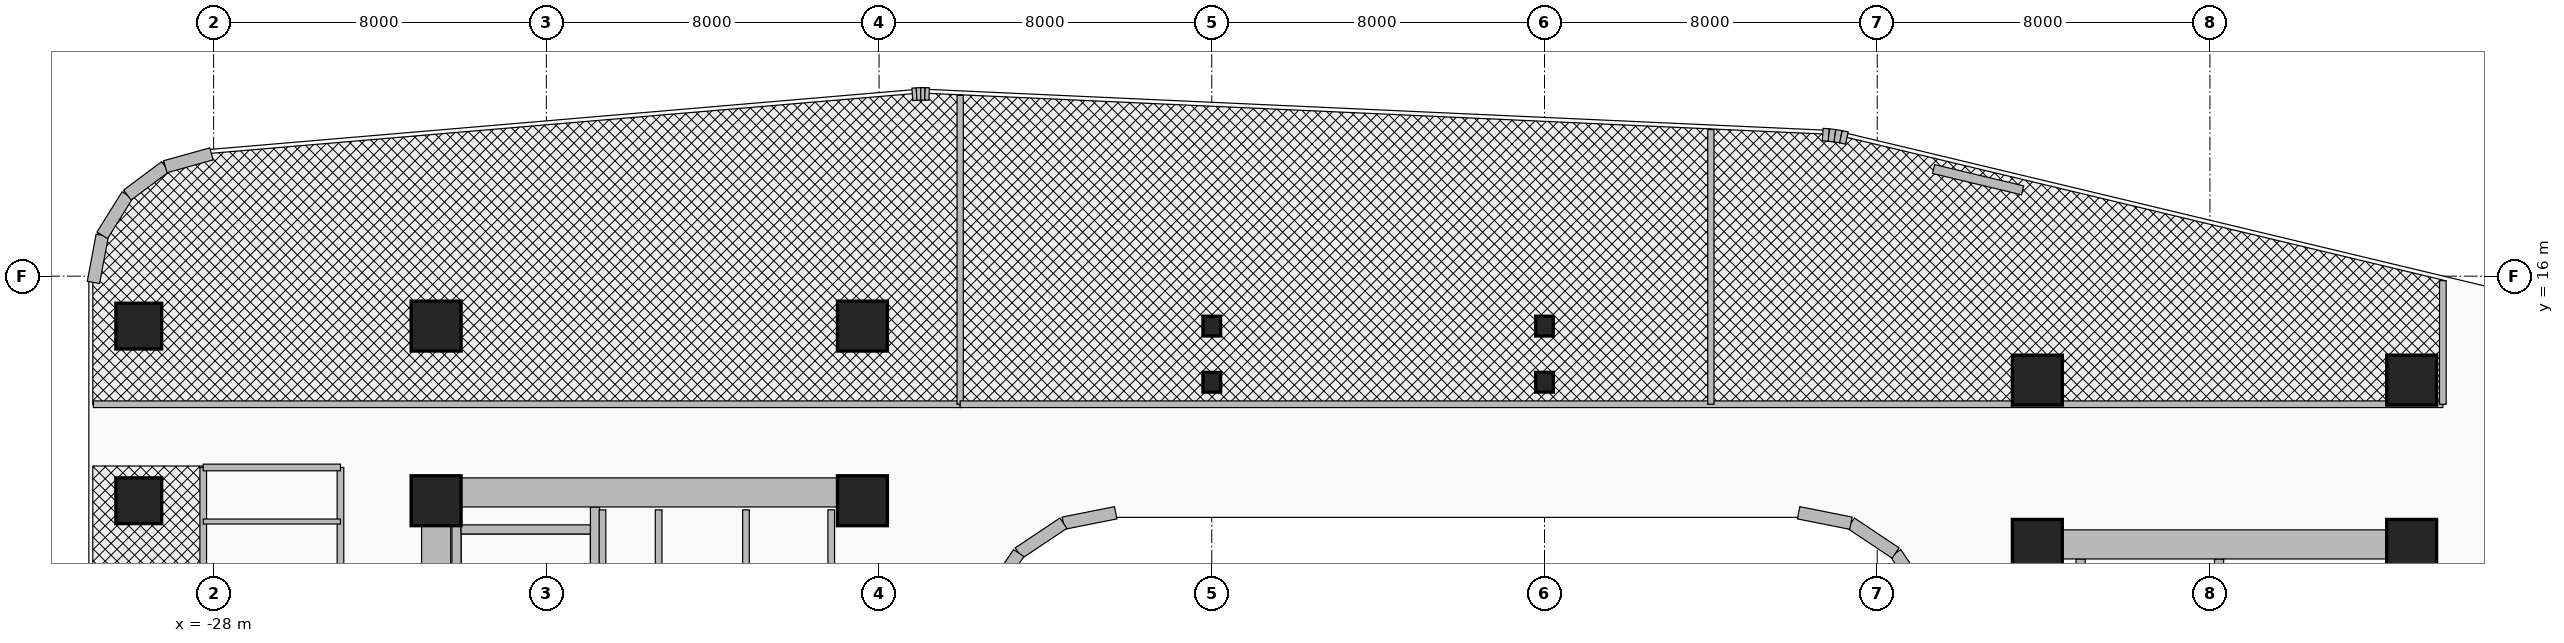
"""IFC4 building model, lengths in metres.
Left out: names, types, materials, properties, quantities, classifications, styles, units other than length and angle.
Written with IfcOpenShell. Run it as: python <this file> out.ifc"""

import sys

from ifc_helpers import new_model, si_unit, direction, frame, frame_2d, origin, origin_2d, place, context, subcontext, project, spatial, rectangle, circle, i_section, extrude, source, transform, mapped, element, fill, save


model = new_model("IFC4")
c1 = context("Model", 3, precision=1e-05, world=origin(), true_north=direction((0.0, 1.0)))
c2 = subcontext(c1, "Body", "Model", "MODEL_VIEW")
j1 = project(units=[si_unit("LENGTHUNIT", "METRE"), si_unit("PLANEANGLEUNIT", "RADIAN")], contexts=[c1])
p1 = place(None, origin())
s1 = spatial("IfcSite", under=j1, at=p1, CompositionType="ELEMENT")
p2 = place(p1, origin())
s2 = spatial("IfcBuilding", under=s1, at=p2, CompositionType="ELEMENT")
p3 = place(p2, frame((0.0, 0.0, 101.1)))
s3 = spatial("IfcBuildingStorey", under=s2, at=p3, CompositionType="ELEMENT", Elevation=101.1)
for number, where, z_axis, x_axis in (
    (1, (-22.16, 1.78, 0.0), (0.0, 0.0, 1.0), (0.0, 1.0, 0.0)),
    (2, (-18.83, 1.78, 0.0), (0.0, 0.0, 1.0), (0.0, 1.0, 0.0)),
):
    element("IfcWall", number, at=place(p3, frame(where, z_axis=z_axis, x_axis=x_axis)), inside=s3, PredefinedType="SHEAR", context=c2, shape_type="SweptSolid", body=[
        extrude(rectangle(XDim=8.67, YDim=0.22, at=frame_2d((4.335, 0.0))), origin(), (0.0, 0.0, 1.0), 4.36),
    ])
p4 = place(p3, frame((-22.05, 9.91, 0.0), z_axis=(0.0, 0.0, 1.0), x_axis=(1.0, 0.0, 0.0)))
e3 = element("IfcWall", 3, at=p4, inside=s3, PredefinedType="SHEAR", context=c2, shape_type="SweptSolid", body=[
    extrude(rectangle(XDim=3.11, YDim=0.22, at=frame_2d((1.555, 0.0))), origin(), (0.0, 0.0, 1.0), 4.36),
])
for number, where, z_axis, x_axis in (
    (4, (16.89, 0.68, 0.0), (0.0, 0.0, 1.0), (0.0, 1.0, 0.0)),
    (5, (20.22, 0.68, 0.0), (0.0, 0.0, 1.0), (0.0, 1.0, 0.0)),
):
    element("IfcWall", number, at=place(p3, frame(where, z_axis=z_axis, x_axis=x_axis)), inside=s3, PredefinedType="SHEAR", context=c2, shape_type="SweptSolid", body=[
        extrude(rectangle(XDim=8.52, YDim=0.22, at=frame_2d((4.26, 0.0))), origin(), (0.0, 0.0, 1.0), 4.36),
    ])
p5 = place(p3, frame((-22.65, -11.15, 0.0), z_axis=(0.0, 0.0, 1.0), x_axis=(0.0, 1.0, 0.0)))
e6 = element("IfcWall", 6, at=p5, inside=s3, PredefinedType="SHEAR", context=c2, shape_type="SweptSolid", body=[
    extrude(rectangle(XDim=22.3, YDim=0.7, at=frame_2d((11.15, 0.0))), origin(), (0.0, 0.0, 1.0), 4.36),
])
p6 = place(p3, frame((-22.65, 10.8, 0.0), z_axis=(0.0, 0.0, 1.0), x_axis=(1.0, 0.0, 0.0)))
e7 = element("IfcWall", 7, at=p6, inside=s3, PredefinedType="SHEAR", context=c2, shape_type="SweptSolid", body=[
    extrude(rectangle(XDim=10.25, YDim=0.7, at=frame_2d((5.125, 0.0))), origin(), (0.0, 0.0, 1.0), 4.36),
])
p7 = place(p3, frame((24.85, 0.95, 0.0), z_axis=(0.0, 0.0, 1.0), x_axis=(0.0, 1.0, 0.0)))
e8 = element("IfcWall", 8, at=p7, inside=s3, PredefinedType="SHEAR", context=c2, shape_type="SweptSolid", body=[
    extrude(rectangle(XDim=8.95, YDim=0.7, at=frame_2d((4.475, 0.0))), origin(), (0.0, 0.0, 1.0), 4.36),
])
p8 = place(p3, frame((15.85, 9.55, 0.0), z_axis=(0.0, 0.0, 1.0), x_axis=(1.0, 0.0, 0.0)))
e9 = element("IfcWall", 9, at=p8, inside=s3, PredefinedType="SHEAR", context=c2, shape_type="SweptSolid", body=[
    extrude(rectangle(XDim=9.0, YDim=0.7, at=frame_2d((4.5, 0.0))), origin(), (0.0, 0.0, 1.0), 4.36),
])
m1 = source(origin(), c2, "Body", "SweptSolid", [
    extrude(circle(Radius=0.55, at=origin_2d()), origin(), (0.0, 0.0, 1.0), 4.6),
])
p9 = place(p3, frame((-29.8, 10.6, 0.0), z_axis=(0.0, 0.0, 1.0), x_axis=(1.0, 0.0, 0.0)))
e10 = element("IfcColumn", 10, at=p9, inside=s3, PredefinedType="COLUMN", context=c2, shape_type="MappedRepresentation", body=[
    mapped(m1, transform((0.0, 0.0, 0.0), x_axis=(1.0, 0.0, 0.0), y_axis=(0.0, 1.0, 0.0), z_axis=(0.0, 0.0, 1.0), scale=1.0)),
])
m2 = source(origin(), c2, "Body", "SweptSolid", [
    extrude(rectangle(XDim=1.2, YDim=1.2, at=origin_2d()), origin(), (0.0, 0.0, 1.0), 4.6),
])
for number, where, z_axis, x_axis in (
    (11, (-22.65, 10.6, 0.0), (0.0, 0.0, 1.0), (1.0, 0.0, 0.0)),
    (12, (-12.4, 10.6, 0.0), (0.0, 0.0, 1.0), (1.0, 0.0, 0.0)),
):
    element("IfcColumn", number, at=place(p3, frame(where, z_axis=z_axis, x_axis=x_axis)), inside=s3, PredefinedType="COLUMN", context=c2, shape_type="MappedRepresentation", body=[
        mapped(m2, transform((0.0, 0.0, 0.0), x_axis=(1.0, 0.0, 0.0), y_axis=(0.0, 1.0, 0.0), z_axis=(0.0, 0.0, 1.0), scale=1.0)),
    ])
p10 = place(p3, frame((-29.8, 14.8, 0.0), z_axis=(0.0, 0.0, 1.0), x_axis=(1.0, 0.0, 0.0)))
e13 = element("IfcColumn", 13, at=p10, inside=s3, PredefinedType="COLUMN", context=c2, shape_type="MappedRepresentation", body=[
    mapped(m1, transform((0.0, 0.0, 0.0), x_axis=(1.0, 0.0, 0.0), y_axis=(0.0, 1.0, 0.0), z_axis=(0.0, 0.0, 1.0), scale=1.0)),
])
for number, where, z_axis, x_axis in (
    (14, (-22.65, 14.8, 0.0), (0.0, 0.0, 1.0), (1.0, 0.0, 0.0)),
    (15, (-12.4, 14.8, 0.0), (0.0, 0.0, 1.0), (1.0, 0.0, 0.0)),
    (16, (15.85, 9.55, 0.0), (0.0, 0.0, 1.0), (1.0, 0.0, 0.0)),
    (17, (24.85, 9.55, 0.0), (0.0, 0.0, 1.0), (1.0, 0.0, 0.0)),
    (18, (15.85, 13.5, 0.0), (0.0, 0.0, 1.0), (1.0, 0.0, 0.0)),
    (19, (24.85, 13.5, 0.0), (0.0, 0.0, 1.0), (1.0, 0.0, 0.0)),
):
    element("IfcColumn", number, at=place(p3, frame(where, z_axis=z_axis, x_axis=x_axis)), inside=s3, PredefinedType="COLUMN", context=c2, shape_type="MappedRepresentation", body=[
        mapped(m2, transform((0.0, 0.0, 0.0), x_axis=(1.0, 0.0, 0.0), y_axis=(0.0, 1.0, 0.0), z_axis=(0.0, 0.0, 1.0), scale=1.0)),
    ])
m3 = source(origin(), c2, "Body", "SweptSolid", [
    extrude(i_section(OverallWidth=0.424, OverallDepth=0.474, WebThickness=0.048, FlangeThickness=0.077, at=origin_2d()), origin(), (0.0, 0.0, 1.0), 4.6),
])
for number, where, z_axis, x_axis in (
    (20, (-4.0, 13.45, 0.0), (0.0, 0.0, 1.0), (1.0, 0.0, 0.0)),
    (21, (-4.0, 14.8, 0.0), (0.0, 0.0, 1.0), (1.0, 0.0, 0.0)),
    (22, (4.0, 13.45, 0.0), (0.0, 0.0, 1.0), (1.0, 0.0, 0.0)),
    (23, (4.0, 14.8, 0.0), (0.0, 0.0, 1.0), (1.0, 0.0, 0.0)),
):
    element("IfcColumn", number, at=place(p3, frame(where, z_axis=z_axis, x_axis=x_axis)), inside=s3, PredefinedType="COLUMN", context=c2, shape_type="MappedRepresentation", body=[
        mapped(m3, transform((0.0, 0.0, 0.0), x_axis=(1.0, 0.0, 0.0), y_axis=(0.0, 1.0, 0.0), z_axis=(0.0, 0.0, 1.0), scale=1.0)),
    ])
p11 = place(p3, frame((-30.89, 15.85, 0.0), z_axis=(0.0, 0.0, 1.0), x_axis=(0.184557499391, 0.982821718023, 0.0)))
e24 = element("IfcWall", 24, at=p11, inside=s3, PredefinedType="SOLIDWALL", context=c2, shape_type="SweptSolid", body=[
    extrude(rectangle(XDim=1.151, YDim=0.3, at=frame_2d((0.575, 0.0))), origin(), (0.0, 0.0, 1.0), 4.36),
])
p12 = place(p3, frame((-30.677, 16.981, 0.0), z_axis=(0.0, 0.0, 1.0), x_axis=(0.52880576008, 0.848742875143, 0.0)))
e25 = element("IfcWall", 25, at=p12, inside=s3, PredefinedType="SOLIDWALL", context=c2, shape_type="SweptSolid", body=[
    extrude(rectangle(XDim=1.141, YDim=0.3, at=frame_2d((0.57, 0.0))), origin(), (0.0, 0.0, 1.0), 4.36),
])
p13 = place(p3, frame((-30.074, 17.95, 0.0), z_axis=(0.0, 0.0, 1.0), x_axis=(0.800975009324, 0.598697782223, 0.0)))
e26 = element("IfcWall", 26, at=p13, inside=s3, PredefinedType="SOLIDWALL", context=c2, shape_type="SweptSolid", body=[
    extrude(rectangle(XDim=1.141, YDim=0.3, at=frame_2d((0.57, 0.0))), origin(), (0.0, 0.0, 1.0), 4.36),
])
p14 = place(p3, frame((-29.161, 18.633, 0.0), z_axis=(0.0, 0.0, 1.0), x_axis=(0.963624193367, 0.267260947313, 0.0)))
e27 = element("IfcWall", 27, at=p14, inside=s3, PredefinedType="SOLIDWALL", context=c2, shape_type="SweptSolid", body=[
    extrude(rectangle(XDim=1.151, YDim=0.3, at=frame_2d((0.575, 0.0))), origin(), (0.0, 0.0, 1.0), 4.36),
])
p15 = place(p3, frame((-11.199, 20.373, 0.0), z_axis=(0.0, 0.0, 1.0), x_axis=(0.997567332166, 0.069709524416, 0.0)))
e28 = element("IfcWall", 28, at=p15, inside=s3, PredefinedType="SOLIDWALL", context=c2, shape_type="SweptSolid", body=[
    extrude(rectangle(XDim=0.102, YDim=0.3, at=frame_2d((0.051, 0.0))), origin(), (0.0, 0.0, 1.0), 4.36),
])
p16 = place(p3, frame((-11.098, 20.38, 0.0), z_axis=(0.0, 0.0, 1.0), x_axis=(0.999334672785, 0.03647206835, 0.0)))
e29 = element("IfcWall", 29, at=p16, inside=s3, PredefinedType="SOLIDWALL", context=c2, shape_type="SweptSolid", body=[
    extrude(rectangle(XDim=0.1, YDim=0.3, at=frame_2d((0.05, 0.0))), origin(), (0.0, 0.0, 1.0), 4.36),
])
p17 = place(p3, frame((-10.998, 20.383, 0.0), z_axis=(0.0, 0.0, 1.0), x_axis=(0.999997054401, 0.002427177317, 0.0)))
e30 = element("IfcWall", 30, at=p17, inside=s3, PredefinedType="SOLIDWALL", context=c2, shape_type="SweptSolid", body=[
    extrude(rectangle(XDim=0.101, YDim=0.3, at=frame_2d((0.05, 0.0))), origin(), (0.0, 0.0, 1.0), 4.36),
])
p18 = place(p3, frame((-10.897, 20.384, 0.0), z_axis=(0.0, 0.0, 1.0), x_axis=(0.999584209171, -0.02883415988, 0.0)))
e31 = element("IfcWall", 31, at=p18, inside=s3, PredefinedType="SOLIDWALL", context=c2, shape_type="SweptSolid", body=[
    extrude(rectangle(XDim=0.102, YDim=0.3, at=frame_2d((0.051, 0.0))), origin(), (0.0, 0.0, 1.0), 4.36),
])
p19 = place(p3, frame((10.69, 19.404, 0.0), z_axis=(0.0, 0.0, 1.0), x_axis=(0.99758310784, -0.069483400546, 0.0)))
e32 = element("IfcWall", 32, at=p19, inside=s3, PredefinedType="SOLIDWALL", context=c2, shape_type="SweptSolid", body=[
    extrude(rectangle(XDim=0.147, YDim=0.3, at=frame_2d((0.074, 0.0))), origin(), (0.0, 0.0, 1.0), 4.36),
])
for number, where, z_axis, x_axis in (
    (33, (10.837, 19.394, 0.0), (0.0, 0.0, 1.0), (0.993, -0.117, 0.0)),
    (34, (10.983, 19.377, 0.0), (0.0, 0.0, 1.0), (0.987, -0.163, 0.0)),
):
    element("IfcWall", number, at=place(p3, frame(where, z_axis=z_axis, x_axis=x_axis)), inside=s3, PredefinedType="SOLIDWALL", context=c2, shape_type="SweptSolid", body=[
        extrude(rectangle(XDim=0.146, YDim=0.3, at=frame_2d((0.073, 0.0))), origin(), (0.0, 0.0, 1.0), 4.36),
    ])
p20 = place(p3, frame((11.127, 19.353, 0.0), z_axis=(0.0, 0.0, 1.0), x_axis=(0.978019841688, -0.208511844421, 0.0)))
e35 = element("IfcWall", 35, at=p20, inside=s3, PredefinedType="SOLIDWALL", context=c2, shape_type="SweptSolid", body=[
    extrude(rectangle(XDim=0.147, YDim=0.3, at=frame_2d((0.074, 0.0))), origin(), (0.0, 0.0, 1.0), 4.36),
])
p21 = place(p3, frame((13.355, 18.576, 0.0), z_axis=(0.0, 0.0, 1.0), x_axis=(0.97252211384, -0.232810519721, 0.0)))
e36 = element("IfcWall", 36, at=p21, inside=s3, PredefinedType="SOLIDWALL", context=c2, shape_type="SweptSolid", body=[
    extrude(rectangle(XDim=2.2, YDim=0.22, at=frame_2d((1.1, 0.0))), origin(), (0.0, 0.0, 1.0), 4.36),
])
p22 = place(p21, frame((0.65, 0.0, 0.95)))
e37 = element("IfcOpeningElement", 37, at=p22, cuts=e36, PredefinedType="OPENING", context=c2, shape_type="SweptSolid", body=[
    extrude(rectangle(XDim=0.9, YDim=1.3, at=frame_2d((0.45, 0.65))), frame((0.0, 0.125, 0.0), z_axis=(0.0, -1.0, 0.0), x_axis=(1.0, 0.0, 0.0)), (0.0, 0.0, 1.0), 0.25),
])
for number, where, z_axis, x_axis in (
    (38, (13.16, 8.268, 0.0), (0.0, 0.0, 1.0), (-0.556, 0.831, 0.0)),
    (39, (12.442, 9.342, 0.0), (0.0, 0.0, 1.0), (-0.831, 0.556, 0.0)),
):
    element("IfcWall", number, at=place(p3, frame(where, z_axis=z_axis, x_axis=x_axis)), inside=s3, PredefinedType="SOLIDWALL", context=c2, shape_type="SweptSolid", body=[
        extrude(rectangle(XDim=1.292, YDim=0.3, at=frame_2d((0.646, 0.0))), origin(), (0.0, 0.0, 1.0), 4.36),
    ])
for number, where, z_axis, x_axis in (
    (40, (11.367, 10.06, 0.0), (0.0, 0.0, 1.0), (-0.981, 0.195, 0.0)),
    (41, (-6.311, 10.31, 0.0), (0.0, 0.0, 1.0), (-0.981, -0.195, 0.0)),
):
    element("IfcWall", number, at=place(p3, frame(where, z_axis=z_axis, x_axis=x_axis)), inside=s3, PredefinedType="SOLIDWALL", context=c2, shape_type="SweptSolid", body=[
        extrude(rectangle(XDim=1.281, YDim=0.3, at=frame_2d((0.641, 0.0))), origin(), (0.0, 0.0, 1.0), 4.36),
    ])
p23 = place(p3, frame((-7.567, 10.06, 0.0), z_axis=(0.0, 0.0, 1.0), x_axis=(-0.831497739511, -0.555528135371, 0.0)))
e42 = element("IfcWall", 42, at=p23, inside=s3, PredefinedType="SOLIDWALL", context=c2, shape_type="SweptSolid", body=[
    extrude(rectangle(XDim=1.292, YDim=0.3, at=frame_2d((0.646, 0.0))), origin(), (0.0, 0.0, 1.0), 4.36),
])
p24 = place(p3, frame((-8.642, 9.342, 0.0), z_axis=(0.0, 0.0, 1.0), x_axis=(-0.555615398575, -0.831439431869, 0.0)))
e43 = element("IfcWall", 43, at=p24, inside=s3, PredefinedType="SOLIDWALL", context=c2, shape_type="SweptSolid", body=[
    extrude(rectangle(XDim=1.292, YDim=0.3, at=frame_2d((0.646, 0.0))), origin(), (0.0, 0.0, 1.0), 4.36),
])
p25 = place(p3, frame((-18.65, 7.45, 0.0), z_axis=(0.0, 0.0, 1.0), x_axis=(0.0, 1.0, 0.0)))
e44 = element("IfcWall", 44, at=p25, inside=s3, PredefinedType="PARTITIONING", context=c2, shape_type="SweptSolid", body=[
    extrude(rectangle(XDim=2.93, YDim=0.16, at=frame_2d((1.465, 0.0))), origin(), (0.0, 0.0, 1.0), 4.36),
])
for number, where, z_axis, x_axis in (
    (45, (-13.15, 8.95, 0.0), (0.0, 0.0, 1.0), (0.0, 1.0, 0.0)),
    (46, (-17.3, 8.95, 0.0), (0.0, 0.0, 1.0), (0.0, 1.0, 0.0)),
    (47, (-15.2, 8.95, 0.0), (0.0, 0.0, 1.0), (0.0, 1.0, 0.0)),
):
    element("IfcWall", number, at=place(p3, frame(where, z_axis=z_axis, x_axis=x_axis)), inside=s3, PredefinedType="PARTITIONING", context=c2, shape_type="SweptSolid", body=[
        extrude(rectangle(XDim=1.43, YDim=0.16, at=frame_2d((0.715, 0.0))), origin(), (0.0, 0.0, 1.0), 4.36),
    ])
p26 = place(p3, frame((-28.25, 8.8, 0.0), z_axis=(0.0, 0.0, 1.0), x_axis=(0.0, 1.0, 0.0)))
e48 = element("IfcWall", 48, at=p26, inside=s3, PredefinedType="PARTITIONING", context=c2, shape_type="SweptSolid", body=[
    extrude(rectangle(XDim=2.6, YDim=0.16, at=frame_2d((1.3, 0.0))), origin(), (0.0, 0.0, 1.0), 3.566),
])
p27 = place(p3, frame((-24.95, 8.8, 0.0), z_axis=(0.0, 0.0, 1.0), x_axis=(0.0, 1.0, 0.0)))
e49 = element("IfcWall", 49, at=p27, inside=s3, PredefinedType="PARTITIONING", context=c2, shape_type="SweptSolid", body=[
    extrude(rectangle(XDim=2.6, YDim=0.16, at=frame_2d((1.3, 0.0))), origin(), (0.0, 0.0, 1.0), 3.566),
])
p28 = place(p27, frame((0.3, 0.0, 0.0)))
e50 = element("IfcOpeningElement", 50, at=p28, cuts=e49, PredefinedType="OPENING", context=c2, shape_type="SweptSolid", body=[
    extrude(rectangle(XDim=0.85, YDim=2.1, at=frame_2d((0.425, 1.05))), frame((0.0, 0.095, 0.0), z_axis=(0.0, -1.0, 0.0), x_axis=(1.0, 0.0, 0.0)), (0.0, 0.0, 1.0), 0.19),
])
p29 = place(p27, frame((1.45, 0.0, 0.0)))
e51 = element("IfcOpeningElement", 51, at=p29, cuts=e49, PredefinedType="OPENING", context=c2, shape_type="SweptSolid", body=[
    extrude(rectangle(XDim=0.85, YDim=2.1, at=frame_2d((0.425, 1.05))), frame((0.0, 0.095, 0.0), z_axis=(0.0, -1.0, 0.0), x_axis=(1.0, 0.0, 0.0)), (0.0, 0.0, 1.0), 0.19),
])
p30 = place(p3, frame((-28.25, 11.4, 0.0), z_axis=(0.0, 0.0, 1.0), x_axis=(1.0, 0.0, 0.0)))
e52 = element("IfcWall", 52, at=p30, inside=s3, PredefinedType="PARTITIONING", context=c2, shape_type="SweptSolid", body=[
    extrude(rectangle(XDim=3.3, YDim=0.16, at=frame_2d((1.65, 0.0))), origin(), (0.0, 0.0, 1.0), 4.36),
])
p31 = place(p3, frame((-28.25, 10.1, 0.0), z_axis=(0.0, 0.0, 1.0), x_axis=(1.0, 0.0, 0.0)))
e53 = element("IfcWall", 53, at=p31, inside=s3, PredefinedType="PARTITIONING", context=c2, shape_type="SweptSolid", body=[
    extrude(rectangle(XDim=3.3, YDim=0.12, at=frame_2d((1.65, 0.0))), origin(), (0.0, 0.0, 1.0), 4.36),
])
p32 = place(p3, frame((-30.89, 12.92, 0.0), z_axis=(0.0, 0.0, 1.0), x_axis=(1.0, 0.0, 0.0)))
e54 = element("IfcWall", 54, at=p32, inside=s3, PredefinedType="PARTITIONING", context=c2, shape_type="SweptSolid", body=[
    extrude(rectangle(XDim=20.84, YDim=0.16, at=frame_2d((10.42, 0.0))), origin(), (0.0, 0.0, 1.0), 3.734),
])
p33 = place(p32, frame((5.74, 0.0, 0.0)))
e55 = element("IfcOpeningElement", 55, at=p33, cuts=e54, PredefinedType="OPENING", context=c2, shape_type="SweptSolid", body=[
    extrude(rectangle(XDim=1.8, YDim=2.15, at=frame_2d((0.9, 1.075))), frame((0.0, 0.095, 0.0), z_axis=(0.0, -1.0, 0.0), x_axis=(1.0, 0.0, 0.0)), (0.0, 0.0, 1.0), 0.19),
])
p34 = place(p3, frame((-10.05, 12.92, 0.0), z_axis=(0.0, 0.0, 1.0), x_axis=(0.0, 1.0, 0.0)))
e56 = element("IfcWall", 56, at=p34, inside=s3, PredefinedType="PARTITIONING", context=c2, shape_type="SweptSolid", body=[
    extrude(rectangle(XDim=7.427, YDim=0.15, at=frame_2d((3.713, 0.0))), origin(), (0.0, 0.0, 1.0), 3.566),
])
p35 = place(p3, frame((-10.05, 12.92, 0.0), z_axis=(0.0, 0.0, 1.0), x_axis=(1.0, 0.0, 0.0)))
e57 = element("IfcWall", 57, at=p35, inside=s3, PredefinedType="PARTITIONING", context=c2, shape_type="SweptSolid", body=[
    extrude(rectangle(XDim=35.65, YDim=0.16, at=frame_2d((17.825, 0.0))), origin(), (0.0, 0.0, 1.0), 3.566),
])
p36 = place(p35, frame((7.0, 0.0, 0.0)))
e58 = element("IfcOpeningElement", 58, at=p36, cuts=e57, PredefinedType="OPENING", context=c2, shape_type="SweptSolid", body=[
    extrude(rectangle(XDim=1.8, YDim=2.15, at=frame_2d((0.9, 1.075))), frame((0.0, 0.095, 0.0), z_axis=(0.0, -1.0, 0.0), x_axis=(1.0, 0.0, 0.0)), (0.0, 0.0, 1.0), 0.19),
])
p37 = place(p35, frame((23.3, 0.0, 0.0)))
e59 = element("IfcOpeningElement", 59, at=p37, cuts=e57, PredefinedType="OPENING", context=c2, shape_type="SweptSolid", body=[
    extrude(rectangle(XDim=1.8, YDim=2.15, at=frame_2d((0.9, 1.075))), frame((0.0, 0.095, 0.0), z_axis=(0.0, -1.0, 0.0), x_axis=(1.0, 0.0, 0.0)), (0.0, 0.0, 1.0), 0.19),
])
p38 = place(p3, frame((8.0, 12.92, 0.0), z_axis=(0.0, 0.0, 1.0), x_axis=(0.0, 1.0, 0.0)))
e60 = element("IfcWall", 60, at=p38, inside=s3, PredefinedType="PARTITIONING", context=c2, shape_type="SweptSolid", body=[
    extrude(rectangle(XDim=6.606, YDim=0.15, at=frame_2d((3.303, 0.0))), origin(), (0.0, 0.0, 1.0), 3.566),
])
p39 = place(p3, frame((25.6, 12.92, 0.0), z_axis=(0.0, 0.0, 1.0), x_axis=(0.0, 1.0, 0.0)))
e61 = element("IfcWall", 61, at=p39, inside=s3, PredefinedType="PARTITIONING", context=c2, shape_type="SweptSolid", body=[
    extrude(rectangle(XDim=2.972, YDim=0.16, at=frame_2d((1.486, 0.0))), origin(), (0.0, 0.0, 1.0), 3.566),
])
p40 = place(p22, origin())
e62 = element("IfcWindow", 62, at=p40, inside=s3, PartitioningType="SINGLE_PANEL", PredefinedType="WINDOW", context=c2, shape_type="SweptSolid", body=[
    extrude(rectangle(XDim=0.9, YDim=1.3, at=frame_2d((0.45, 0.65))), frame((0.0, 0.03, 0.0), z_axis=(0.0, -1.0, 0.0), x_axis=(1.0, 0.0, 0.0)), (0.0, 0.0, 1.0), 0.06),
])
fill(e37, e62)
p41 = place(p28, origin())
e63 = element("IfcDoor", 63, at=p41, inside=s3, OperationType="SINGLE_SWING_RIGHT", PredefinedType="DOOR", context=c2, shape_type="SweptSolid", body=[
    extrude(rectangle(XDim=0.85, YDim=2.1, at=frame_2d((0.425, 1.05))), frame((0.0, 0.025, 0.0), z_axis=(0.0, -1.0, 0.0), x_axis=(1.0, 0.0, 0.0)), (0.0, 0.0, 1.0), 0.05),
])
fill(e50, e63)
p42 = place(p29, origin())
e64 = element("IfcDoor", 64, at=p42, inside=s3, OperationType="SINGLE_SWING_LEFT", PredefinedType="DOOR", context=c2, shape_type="SweptSolid", body=[
    extrude(rectangle(XDim=0.85, YDim=2.1, at=frame_2d((0.425, 1.05))), frame((0.0, 0.025, 0.0), z_axis=(0.0, -1.0, 0.0), x_axis=(1.0, 0.0, 0.0)), (0.0, 0.0, 1.0), 0.05),
])
fill(e51, e64)
p43 = place(p33, frame((1.8, 0.0, 0.0), z_axis=(0.0, 0.0, 1.0), x_axis=(-1.0, 0.0, 0.0)))
e65 = element("IfcDoor", 65, at=p43, inside=s3, OperationType="DOUBLE_DOOR_SINGLE_SWING", PredefinedType="DOOR", context=c2, shape_type="SweptSolid", body=[
    extrude(rectangle(XDim=1.8, YDim=2.15, at=frame_2d((0.9, 1.075))), frame((0.0, 0.025, 0.0), z_axis=(0.0, -1.0, 0.0), x_axis=(1.0, 0.0, 0.0)), (0.0, 0.0, 1.0), 0.05),
])
fill(e55, e65)
p44 = place(p36, frame((1.8, 0.0, 0.0), z_axis=(0.0, 0.0, 1.0), x_axis=(-1.0, 0.0, 0.0)))
e66 = element("IfcDoor", 66, at=p44, inside=s3, OperationType="DOUBLE_DOOR_SINGLE_SWING", PredefinedType="DOOR", context=c2, shape_type="SweptSolid", body=[
    extrude(rectangle(XDim=1.8, YDim=2.15, at=frame_2d((0.9, 1.075))), frame((0.0, 0.025, 0.0), z_axis=(0.0, -1.0, 0.0), x_axis=(1.0, 0.0, 0.0)), (0.0, 0.0, 1.0), 0.05),
])
fill(e58, e66)
p45 = place(p37, origin())
e67 = element("IfcDoor", 67, at=p45, inside=s3, OperationType="DOUBLE_DOOR_SINGLE_SWING", PredefinedType="DOOR", context=c2, shape_type="SweptSolid", body=[
    extrude(rectangle(XDim=1.8, YDim=2.15, at=frame_2d((0.9, 1.075))), frame((0.0, 0.025, 0.0), z_axis=(0.0, -1.0, 0.0), x_axis=(1.0, 0.0, 0.0)), (0.0, 0.0, 1.0), 0.05),
])
fill(e59, e67)
save(model, sys.argv[1])
